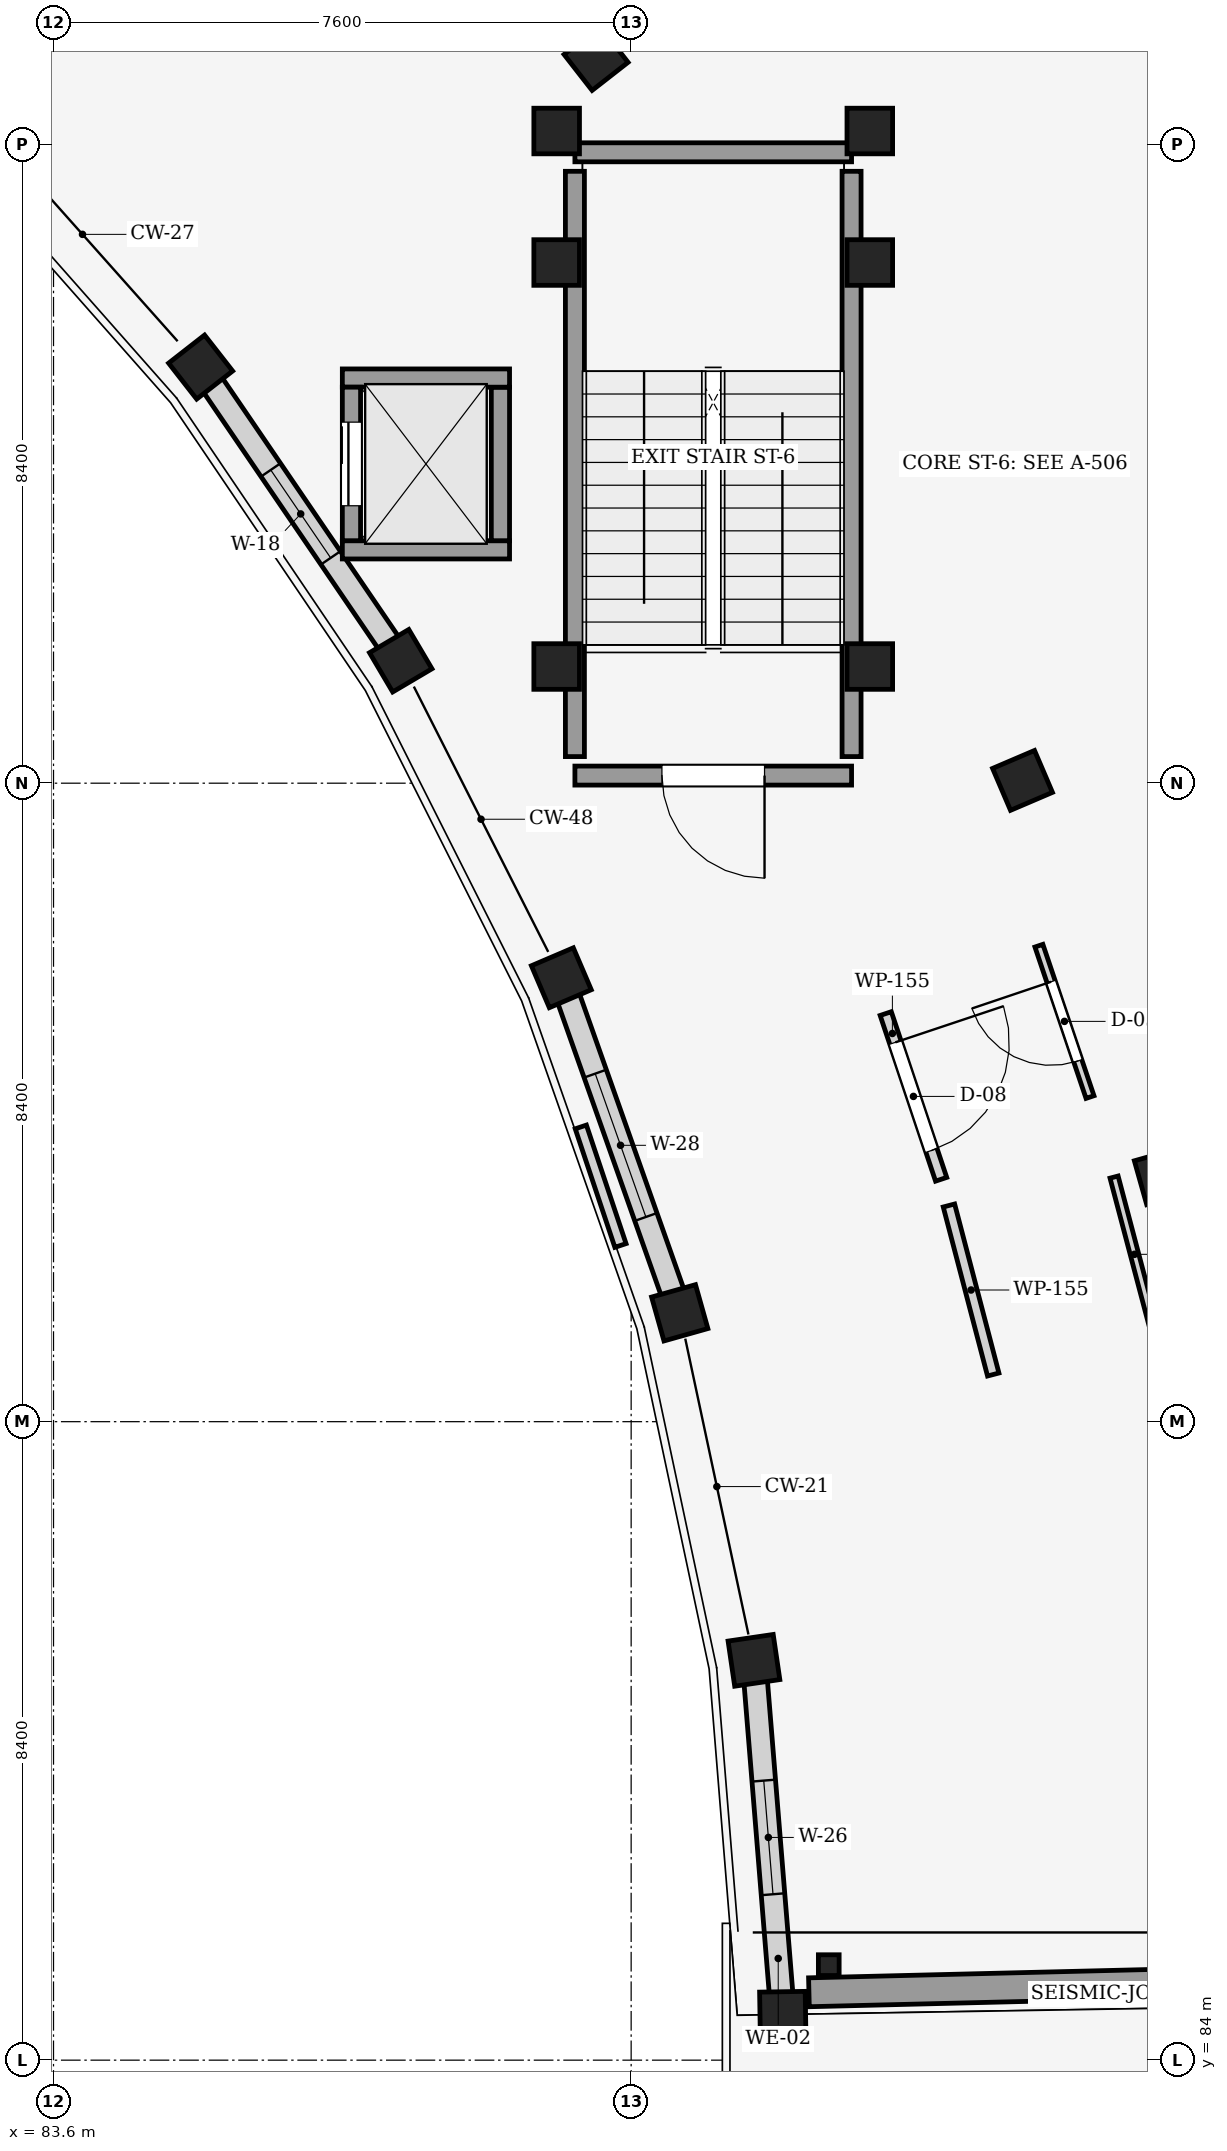
"""IFC4 building model, lengths in metres.
Left out: names, types, materials, properties, quantities, classifications, styles, units other than length and angle.
Written with IfcOpenShell. Run it as: python <this file> out.ifc"""

import sys

from ifc_helpers import new_model, si_unit, direction, frame, frame_2d, origin, origin_2d, place, context, subcontext, project, spatial, rectangle, hollow_circle, extrude, element, fill, save


model = new_model("IFC4")
c1 = context("Model", 3, precision=1e-05, world=origin(), true_north=direction((0.0, 1.0)))
c2 = subcontext(c1, "Body", "Model", "MODEL_VIEW")
j1 = project(units=[si_unit("LENGTHUNIT", "METRE"), si_unit("PLANEANGLEUNIT", "RADIAN")], contexts=[c1])
p1 = place(None, origin())
s1 = spatial("IfcSite", under=j1, at=p1, CompositionType="ELEMENT")
p2 = place(p1, origin())
s2 = spatial("IfcBuilding", under=s1, at=p2, CompositionType="ELEMENT")
p3 = place(p2, frame((0.0, 0.0, 13.2)))
s3 = spatial("IfcBuildingStorey", under=s2, at=p3, CompositionType="ELEMENT", Elevation=13.2)
for number, where, z_axis, x_axis in (
    (1, (93.195, 84.6, 0.0), (0.0, 0.0, 1.0), (1.0, 0.017, 0.0)),
    (2, (92.816, 89.26, 0.0), (0.0, 0.0, 1.0), (0.989, 0.145, 0.0)),
    (3, (91.839, 93.832, 0.0), (0.0, 0.0, 1.0), (0.962, 0.272, 0.0)),
    (4, (98.191, 95.625, 0.0), (0.0, 0.0, 1.0), (0.962, 0.272, 0.0)),
    (5, (90.281, 98.24, 0.0), (0.0, 0.0, 1.0), (0.919, 0.393, 0.0)),
    (6, (96.349, 100.837, 0.0), (0.0, 0.0, 1.0), (0.919, 0.393, 0.0)),
    (7, (88.168, 102.411, 0.0), (0.0, 0.0, 1.0), (0.861, 0.509, 0.0)),
    (8, (85.536, 106.274, 0.0), (0.0, 0.0, 1.0), (0.788, 0.615, 0.0)),
    (9, (90.738, 110.336, 0.0), (0.0, 0.0, 1.0), (0.788, 0.615, 0.0)),
):
    element("IfcColumn", number, at=place(p3, frame(where, z_axis=z_axis, x_axis=x_axis)), inside=s3, PredefinedType="COLUMN", context=c2, shape_type="SweptSolid", body=[
        extrude(rectangle(XDim=0.6, YDim=0.6, at=origin_2d()), origin(), (0.0, 0.0, 1.0), 4.05),
    ])
p4 = place(p3, frame((93.8, 85.25, 0.0), z_axis=(0.0, 0.0, 1.0), x_axis=(1.0, 0.0, 0.0)))
e10 = element("IfcColumn", 10, at=p4, inside=s3, PredefinedType="COLUMN", context=c2, shape_type="SweptSolid", body=[
    extrude(hollow_circle(Radius=0.136, WallThickness=0.016, at=origin_2d()), origin(), (0.0, 0.0, 1.0), 3.82),
])
for number, where, z_axis, x_axis in (
    (11, (94.34, 102.335, 0.0), (0.0, 0.0, 1.0), (1.0, 0.0, 0.0)),
    (12, (90.22, 102.335, 0.0), (0.0, 0.0, 1.0), (1.0, 0.0, 0.0)),
    (13, (94.34, 107.65, 0.0), (0.0, 0.0, 1.0), (1.0, 0.0, 0.0)),
    (14, (90.22, 107.65, 0.0), (0.0, 0.0, 1.0), (1.0, 0.0, 0.0)),
    (15, (94.34, 109.38, 0.0), (0.0, 0.0, 1.0), (1.0, 0.0, 0.0)),
    (16, (90.22, 109.38, 0.0), (0.0, 0.0, 1.0), (1.0, 0.0, 0.0)),
):
    element("IfcColumn", number, at=place(p3, frame(where, z_axis=z_axis, x_axis=x_axis)), inside=s3, PredefinedType="COLUMN", context=c2, shape_type="SweptSolid", body=[
        extrude(rectangle(XDim=0.6, YDim=0.6, at=origin_2d()), origin(), (0.0, 0.0, 1.0), 4.05),
    ])
p5 = place(p3, frame((93.176, 84.835, 0.0), z_axis=(0.0, 0.0, 1.0), x_axis=(-0.081074723481, 0.99670802606, 0.0)))
e17 = element("IfcWall", 17, at=p5, inside=s3, PredefinedType="STANDARD", context=c2, shape_type="SweptSolid", body=[
    extrude(rectangle(XDim=4.204, YDim=0.31, at=frame_2d((2.102, 0.0))), origin(), (0.0, 0.0, 1.0), 3.015),
])
p6 = place(p5, frame((1.352, 0.0, 0.85)))
e18 = element("IfcOpeningElement", 18, at=p6, cuts=e17, PredefinedType="OPENING", context=c2, shape_type="SweptSolid", body=[
    extrude(rectangle(XDim=1.5, YDim=1.85, at=frame_2d((0.75, 0.925))), frame((0.0, 0.165, 0.0), z_axis=(0.0, -1.0, 0.0), x_axis=(1.0, 0.0, 0.0)), (0.0, 0.0, 1.0), 0.33),
])
p7 = place(p3, frame((91.756, 94.067, 0.0), z_axis=(0.0, 0.0, 1.0), x_axis=(-0.333168640656, 0.942867253055, 0.0)))
e19 = element("IfcWall", 19, at=p7, inside=s3, PredefinedType="STANDARD", context=c2, shape_type="SweptSolid", body=[
    extrude(rectangle(XDim=4.177, YDim=0.31, at=frame_2d((2.088, 0.0))), origin(), (0.0, 0.0, 1.0), 3.015),
])
p8 = place(p7, frame((1.088, 0.0, 0.85)))
e20 = element("IfcOpeningElement", 20, at=p8, cuts=e19, PredefinedType="OPENING", context=c2, shape_type="SweptSolid", body=[
    extrude(rectangle(XDim=2.0, YDim=1.85, at=frame_2d((1.0, 0.925))), frame((0.0, 0.165, 0.0), z_axis=(0.0, -1.0, 0.0), x_axis=(1.0, 0.0, 0.0)), (0.0, 0.0, 1.0), 0.33),
])
p9 = place(p3, frame((95.786, 113.916, 0.0), z_axis=(0.0, 0.0, 1.0), x_axis=(0.563132935525, -0.826366321269, 0.0)))
e21 = element("IfcWall", 21, at=p9, inside=s3, PredefinedType="STANDARD", context=c2, shape_type="SweptSolid", body=[
    extrude(rectangle(XDim=5.76, YDim=0.22, at=frame_2d((2.88, 0.0))), origin(), (0.0, 0.0, 1.0), 3.015),
])
p10 = place(p9, frame((2.33, 0.0, 0.85)))
e22 = element("IfcOpeningElement", 22, at=p10, cuts=e21, PredefinedType="OPENING", context=c2, shape_type="SweptSolid", body=[
    extrude(rectangle(XDim=1.1, YDim=1.35, at=frame_2d((0.55, 0.675))), frame((0.0, 0.12, 0.0), z_axis=(0.0, -1.0, 0.0), x_axis=(1.0, 0.0, 0.0)), (0.0, 0.0, 1.0), 0.24),
])
p11 = place(p3, frame((88.008, 102.646, 0.0), z_axis=(0.0, 0.0, 1.0), x_axis=(-0.56312281457, 0.826373218171, 0.0)))
e23 = element("IfcWall", 23, at=p11, inside=s3, PredefinedType="STANDARD", context=c2, shape_type="SweptSolid", body=[
    extrude(rectangle(XDim=4.106, YDim=0.31, at=frame_2d((2.053, 0.0))), origin(), (0.0, 0.0, 1.0), 3.7),
])
p12 = place(p11, frame((1.353, 0.0, 0.85)))
e24 = element("IfcOpeningElement", 24, at=p12, cuts=e23, PredefinedType="OPENING", context=c2, shape_type="SweptSolid", body=[
    extrude(rectangle(XDim=1.4, YDim=1.65, at=frame_2d((0.7, 0.825))), frame((0.0, 0.165, 0.0), z_axis=(0.0, -1.0, 0.0), x_axis=(1.0, 0.0, 0.0)), (0.0, 0.0, 1.0), 0.33),
])
p13 = place(p3, frame((103.85, 85.145, 0.0), z_axis=(0.0, 0.0, 1.0), x_axis=(-0.999701591947, -0.024427997417, 0.0)))
e25 = element("IfcWall", 25, at=p13, inside=s3, PredefinedType="SHEAR", context=c2, shape_type="SweptSolid", body=[
    extrude(rectangle(XDim=10.314, YDim=0.38, at=frame_2d((5.157, 0.0))), origin(), (0.0, 0.0, 1.0), 3.75),
])
p14 = place(p3, frame((94.1, 100.9, 0.0), z_axis=(0.0, 0.0, 1.0), x_axis=(-1.0, 0.0, 0.0)))
e26 = element("IfcWall", 26, at=p14, inside=s3, PredefinedType="SHEAR", context=c2, shape_type="SweptSolid", body=[
    extrude(rectangle(XDim=3.64, YDim=0.25, at=frame_2d((1.82, 0.0))), origin(), (0.0, 0.0, 1.0), 4.05),
])
p15 = place(p14, frame((1.145, 0.0, 0.0)))
e27 = element("IfcOpeningElement", 27, at=p15, cuts=e26, PredefinedType="OPENING", context=c2, shape_type="SweptSolid", body=[
    extrude(rectangle(XDim=1.35, YDim=2.2, at=frame_2d((0.675, 1.1))), frame((0.0, 0.135, 0.0), z_axis=(0.0, -1.0, 0.0), x_axis=(1.0, 0.0, 0.0)), (0.0, 0.0, 1.0), 0.27),
])
p16 = place(p3, frame((90.46, 101.15, 0.0), z_axis=(0.0, 0.0, 1.0), x_axis=(0.0, 1.0, 0.0)))
e28 = element("IfcWall", 28, at=p16, inside=s3, PredefinedType="SHEAR", context=c2, shape_type="SweptSolid", body=[
    extrude(rectangle(XDim=7.7, YDim=0.25, at=frame_2d((3.85, 0.0))), origin(), (0.0, 0.0, 1.0), 4.05),
])
p17 = place(p3, frame((90.46, 109.1, 0.0), z_axis=(0.0, 0.0, 1.0), x_axis=(1.0, 0.0, 0.0)))
e29 = element("IfcWall", 29, at=p17, inside=s3, PredefinedType="SHEAR", context=c2, shape_type="SweptSolid", body=[
    extrude(rectangle(XDim=3.64, YDim=0.25, at=frame_2d((1.82, 0.0))), origin(), (0.0, 0.0, 1.0), 4.05),
])
p18 = place(p3, frame((94.1, 108.85, 0.0), z_axis=(0.0, 0.0, 1.0), x_axis=(0.0, -1.0, 0.0)))
e30 = element("IfcWall", 30, at=p18, inside=s3, PredefinedType="SHEAR", context=c2, shape_type="SweptSolid", body=[
    extrude(rectangle(XDim=7.7, YDim=0.25, at=frame_2d((3.85, 0.0))), origin(), (0.0, 0.0, 1.0), 4.05),
])
p19 = place(p3, frame((89.6, 103.87, 0.0), z_axis=(0.0, 0.0, 1.0), x_axis=(-1.0, 0.0, 0.0)))
e31 = element("IfcWall", 31, at=p19, inside=s3, PredefinedType="SHEAR", context=c2, shape_type="SweptSolid", body=[
    extrude(rectangle(XDim=2.2, YDim=0.24, at=frame_2d((1.1, 0.0))), origin(), (0.0, 0.0, 1.0), 4.05),
])
p20 = place(p3, frame((89.48, 106.01, 0.0), z_axis=(0.0, 0.0, 1.0), x_axis=(0.0, -1.0, 0.0)))
e32 = element("IfcWall", 32, at=p20, inside=s3, PredefinedType="SHEAR", context=c2, shape_type="SweptSolid", body=[
    extrude(rectangle(XDim=2.02, YDim=0.24, at=frame_2d((1.01, 0.0))), origin(), (0.0, 0.0, 1.0), 4.05),
])
p21 = place(p3, frame((87.4, 106.13, 0.0), z_axis=(0.0, 0.0, 1.0), x_axis=(1.0, 0.0, 0.0)))
e33 = element("IfcWall", 33, at=p21, inside=s3, PredefinedType="SHEAR", context=c2, shape_type="SweptSolid", body=[
    extrude(rectangle(XDim=2.2, YDim=0.24, at=frame_2d((1.1, 0.0))), origin(), (0.0, 0.0, 1.0), 4.05),
])
p22 = place(p3, frame((87.52, 103.99, 0.0), z_axis=(0.0, 0.0, 1.0), x_axis=(0.0, 1.0, 0.0)))
e34 = element("IfcWall", 34, at=p22, inside=s3, PredefinedType="SHEAR", context=c2, shape_type="SweptSolid", body=[
    extrude(rectangle(XDim=2.02, YDim=0.24, at=frame_2d((1.01, 0.0))), origin(), (0.0, 0.0, 1.0), 4.05),
])
p23 = place(p22, frame((0.46, 0.0, 0.0)))
e35 = element("IfcOpeningElement", 35, at=p23, cuts=e34, PredefinedType="OPENING", context=c2, shape_type="SweptSolid", body=[
    extrude(rectangle(XDim=1.1, YDim=2.15, at=frame_2d((0.55, 1.075))), frame((0.0, 0.13, 0.0), z_axis=(0.0, -1.0, 0.0), x_axis=(1.0, 0.0, 0.0)), (0.0, 0.0, 1.0), 0.26),
])
p24 = place(p3, frame((98.091, 93.586, 0.0), z_axis=(0.0, 0.0, 1.0), x_axis=(-0.255630783162, 0.96677448389, 0.0)))
e36 = element("IfcWall", 36, at=p24, inside=s3, PredefinedType="PARTITIONING", context=c2, shape_type="SweptSolid", body=[
    extrude(rectangle(XDim=2.102, YDim=0.11, at=frame_2d((1.051, 0.0))), origin(), (0.0, 0.0, 1.0), 3.015),
])
p25 = place(p3, frame((97.237, 96.671, 0.0), z_axis=(0.0, 0.0, 1.0), x_axis=(-0.319884220621, 0.947456640379, 0.0)))
e37 = element("IfcWall", 37, at=p25, inside=s3, PredefinedType="PARTITIONING", context=c2, shape_type="SweptSolid", body=[
    extrude(rectangle(XDim=2.102, YDim=0.11, at=frame_2d((1.051, 0.0))), origin(), (0.0, 0.0, 1.0), 3.7),
])
p26 = place(p25, frame((0.501, 0.0, 0.0)))
e38 = element("IfcOpeningElement", 38, at=p26, cuts=e37, PredefinedType="OPENING", context=c2, shape_type="SweptSolid", body=[
    extrude(rectangle(XDim=1.1, YDim=2.1, at=frame_2d((0.55, 1.05))), frame((0.0, 0.065, 0.0), z_axis=(0.0, -1.0, 0.0), x_axis=(1.0, 0.0, 0.0)), (0.0, 0.0, 1.0), 0.13),
])
p27 = place(p3, frame((94.55, 97.769, 0.0), z_axis=(0.0, 0.0, 1.0), x_axis=(0.317151668087, -0.94837483066, 0.0)))
e39 = element("IfcWall", 39, at=p27, inside=s3, PredefinedType="PARTITIONING", context=c2, shape_type="SweptSolid", body=[
    extrude(rectangle(XDim=2.299, YDim=0.155, at=frame_2d((1.149, 0.0))), origin(), (0.0, 0.0, 1.0), 3.7),
])
p28 = place(p27, frame((0.399, 0.0, 0.0)))
e40 = element("IfcOpeningElement", 40, at=p28, cuts=e39, PredefinedType="OPENING", context=c2, shape_type="SweptSolid", body=[
    extrude(rectangle(XDim=1.5, YDim=2.1, at=frame_2d((0.75, 1.05))), frame((0.0, 0.087, 0.0), z_axis=(0.0, -1.0, 0.0), x_axis=(1.0, 0.0, 0.0)), (0.0, 0.0, 1.0), 0.175),
])
p29 = place(p3, frame((95.381, 95.244, 0.0), z_axis=(0.0, 0.0, 1.0), x_axis=(0.253416186792, -0.96735734673, 0.0)))
e41 = element("IfcWall", 41, at=p29, inside=s3, PredefinedType="PARTITIONING", context=c2, shape_type="SweptSolid", body=[
    extrude(rectangle(XDim=2.299, YDim=0.155, at=frame_2d((1.149, 0.0))), origin(), (0.0, 0.0, 1.0), 3.015),
])
p30 = place(p3, frame((91.059, 94.718, 0.0), z_axis=(0.0, 0.0, 1.0), x_axis=(-0.317163065143, 0.948371019227, 0.0)))
e42 = element("IfcWall", 42, at=p30, inside=s3, PredefinedType="PARTITIONING", context=c2, shape_type="SweptSolid", body=[
    extrude(rectangle(XDim=1.644, YDim=0.155, at=frame_2d((0.822, 0.0))), origin(), (0.0, 0.0, 1.0), 3.165),
])
p31 = place(p6, origin())
e43 = element("IfcWindow", 43, at=p31, inside=s3, PartitioningType="SINGLE_PANEL", PredefinedType="WINDOW", context=c2, shape_type="SweptSolid", body=[
    extrude(rectangle(XDim=1.5, YDim=1.85, at=frame_2d((0.75, 0.925))), frame((0.0, 0.03, 0.0), z_axis=(0.0, -1.0, 0.0), x_axis=(1.0, 0.0, 0.0)), (0.0, 0.0, 1.0), 0.06),
])
fill(e18, e43)
p32 = place(p8, origin())
e44 = element("IfcWindow", 44, at=p32, inside=s3, PartitioningType="SINGLE_PANEL", PredefinedType="WINDOW", context=c2, shape_type="SweptSolid", body=[
    extrude(rectangle(XDim=2.0, YDim=1.85, at=frame_2d((1.0, 0.925))), frame((0.0, 0.03, 0.0), z_axis=(0.0, -1.0, 0.0), x_axis=(1.0, 0.0, 0.0)), (0.0, 0.0, 1.0), 0.06),
])
fill(e20, e44)
p33 = place(p12, origin())
e45 = element("IfcWindow", 45, at=p33, inside=s3, PartitioningType="SINGLE_PANEL", PredefinedType="WINDOW", context=c2, shape_type="SweptSolid", body=[
    extrude(rectangle(XDim=1.4, YDim=1.65, at=frame_2d((0.7, 0.825))), frame((0.0, 0.03, 0.0), z_axis=(0.0, -1.0, 0.0), x_axis=(1.0, 0.0, 0.0)), (0.0, 0.0, 1.0), 0.06),
])
fill(e24, e45)
p34 = place(p15, origin())
e46 = element("IfcDoor", 46, at=p34, inside=s3, OperationType="SINGLE_SWING_LEFT", PredefinedType="DOOR", context=c2, shape_type="SweptSolid", body=[
    extrude(rectangle(XDim=1.35, YDim=2.2, at=frame_2d((0.675, 1.1))), frame((0.0, 0.025, 0.0), z_axis=(0.0, -1.0, 0.0), x_axis=(1.0, 0.0, 0.0)), (0.0, 0.0, 1.0), 0.05),
])
fill(e27, e46)
p35 = place(p23, origin())
e47 = element("IfcDoor", 47, at=p35, inside=s3, OperationType="SLIDING_TO_RIGHT", PredefinedType="DOOR", context=c2, shape_type="SweptSolid", body=[
    extrude(rectangle(XDim=1.1, YDim=2.15, at=frame_2d((0.55, 1.075))), frame((0.0, 0.025, 0.0), z_axis=(0.0, -1.0, 0.0), x_axis=(1.0, 0.0, 0.0)), (0.0, 0.0, 1.0), 0.05),
])
fill(e35, e47)
p36 = place(p26, origin())
e48 = element("IfcDoor", 48, at=p36, inside=s3, OperationType="SINGLE_SWING_RIGHT", PredefinedType="DOOR", context=c2, shape_type="SweptSolid", body=[
    extrude(rectangle(XDim=1.1, YDim=2.1, at=frame_2d((0.55, 1.05))), frame((0.0, 0.025, 0.0), z_axis=(0.0, -1.0, 0.0), x_axis=(1.0, 0.0, 0.0)), (0.0, 0.0, 1.0), 0.05),
])
fill(e38, e48)
p37 = place(p28, origin())
e49 = element("IfcDoor", 49, at=p37, inside=s3, OperationType="SINGLE_SWING_LEFT", PredefinedType="DOOR", context=c2, shape_type="SweptSolid", body=[
    extrude(rectangle(XDim=1.5, YDim=2.1, at=frame_2d((0.75, 1.05))), frame((0.0, 0.025, 0.0), z_axis=(0.0, -1.0, 0.0), x_axis=(1.0, 0.0, 0.0)), (0.0, 0.0, 1.0), 0.05),
])
fill(e40, e49)
save(model, sys.argv[1])
